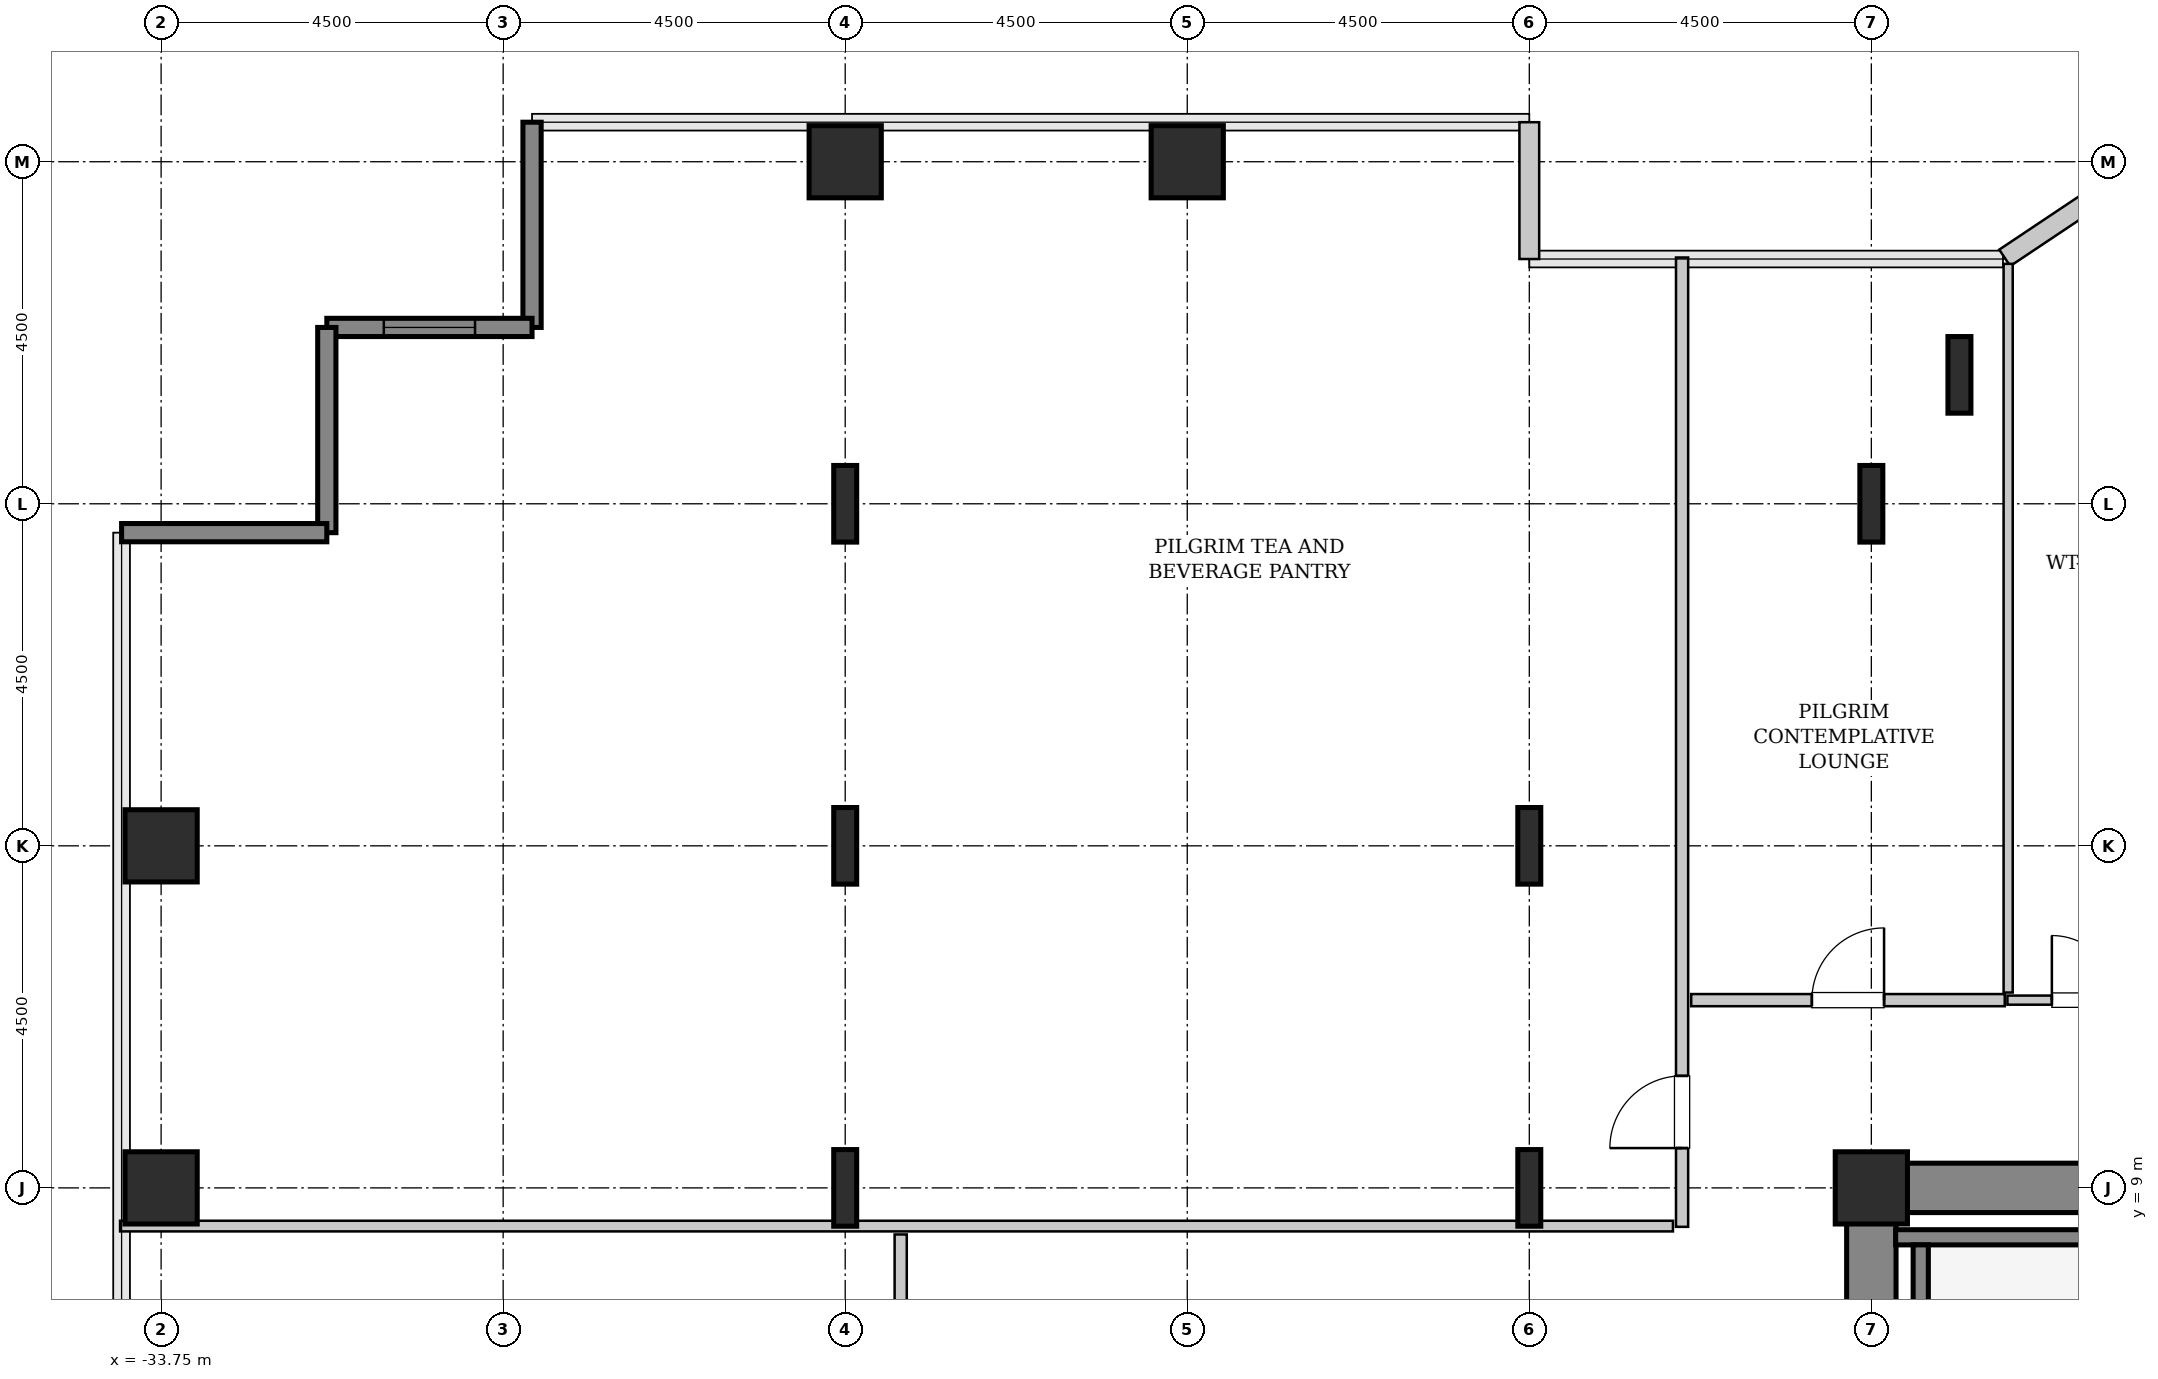
"""IFC4 building model, lengths in metres.
Left out: names, types, materials, properties, quantities, classifications, styles, units other than length and angle.
Written with IfcOpenShell. Run it as: python <this file> out.ifc"""

import sys

from ifc_helpers import new_model, si_unit, direction, frame, frame_2d, origin, origin_2d, place, context, subcontext, project, spatial, rectangle, hollow_rectangle, i_section, extrude, source, transform, mapped, element, fill, save


model = new_model("IFC4")
c1 = context("Model", 3, precision=1e-05, world=origin(), true_north=direction((0.0, 1.0)))
c2 = subcontext(c1, "Body", "Model", "MODEL_VIEW")
j1 = project(units=[si_unit("LENGTHUNIT", "METRE"), si_unit("PLANEANGLEUNIT", "RADIAN")], contexts=[c1])
p1 = place(None, origin())
s1 = spatial("IfcSite", under=j1, at=p1, CompositionType="ELEMENT")
p2 = place(p1, origin())
s2 = spatial("IfcBuilding", under=s1, at=p2, CompositionType="ELEMENT")
p3 = place(p2, frame((0.0, 0.0, 63.4)))
s3 = spatial("IfcBuildingStorey", under=s2, at=p3, CompositionType="ELEMENT", Elevation=63.4)
m1 = source(origin(), c2, "Body", "SweptSolid", [
    extrude(rectangle(XDim=10.025, YDim=0.65, at=frame_2d((5.012, 0.0))), origin(), (0.0, 0.0, 1.0), 3.8),
])
p4 = place(p3, frame((-11.575, 9.0, 0.0), z_axis=(0.0, 0.0, 1.0), x_axis=(1.0, 0.0, 0.0)))
e1 = element("IfcWall", 1, at=p4, inside=s3, PredefinedType="SHEAR", context=c2, shape_type="MappedRepresentation", body=[
    mapped(m1, transform((0.0, 0.0, 0.0), x_axis=(1.0, 0.0, 0.0), y_axis=(0.0, 1.0, 0.0), z_axis=(0.0, 0.0, 1.0), scale=1.0)),
])
m2 = source(origin(), c2, "Body", "SweptSolid", [
    extrude(rectangle(XDim=7.325, YDim=0.65, at=frame_2d((3.663, 0.0))), origin(), (0.0, 0.0, 1.0), 3.8),
])
p5 = place(p3, frame((-11.25, 1.35, 0.0), z_axis=(0.0, 0.0, 1.0), x_axis=(0.0, 1.0, 0.0)))
e2 = element("IfcWall", 2, at=p5, inside=s3, PredefinedType="SHEAR", context=c2, shape_type="MappedRepresentation", body=[
    mapped(m2, transform((0.0, 0.0, 0.0), x_axis=(1.0, 0.0, 0.0), y_axis=(0.0, 1.0, 0.0), z_axis=(0.0, 0.0, 1.0), scale=1.0)),
])
m3 = source(origin(), c2, "Body", "SweptSolid", [
    extrude(hollow_rectangle(XDim=0.95, YDim=0.95, WallThickness=0.045, InnerFilletRadius=0.045, OuterFilletRadius=0.09, at=origin_2d()), origin(), (0.0, 0.0, 1.0), 3.8),
])
for number, where, z_axis, x_axis in (
    (3, (-33.75, 9.0, 0.0), (0.0, 0.0, 1.0), (1.0, 0.0, 0.0)),
    (4, (-33.75, 13.5, 0.0), (0.0, 0.0, 1.0), (1.0, 0.0, 0.0)),
):
    element("IfcColumn", number, at=place(p3, frame(where, z_axis=z_axis, x_axis=x_axis)), inside=s3, PredefinedType="COLUMN", context=c2, shape_type="MappedRepresentation", body=[
        mapped(m3, transform((0.0, 0.0, 0.0), x_axis=(1.0, 0.0, 0.0), y_axis=(0.0, 1.0, 0.0), z_axis=(0.0, 0.0, 1.0), scale=1.0)),
    ])
m4 = source(origin(), c2, "Body", "SweptSolid", [
    extrude(i_section(OverallWidth=0.302, OverallDepth=1.008, WebThickness=0.021, FlangeThickness=0.04, FilletRadius=0.03, at=origin_2d()), origin(), (0.0, 0.0, 1.0), 3.8),
])
for number, where, z_axis, x_axis in (
    (5, (-24.75, 9.0, 0.0), (0.0, 0.0, 1.0), (1.0, 0.0, 0.0)),
    (6, (-24.75, 13.5, 0.0), (0.0, 0.0, 1.0), (1.0, 0.0, 0.0)),
    (7, (-24.75, 18.0, 0.0), (0.0, 0.0, 1.0), (1.0, 0.0, 0.0)),
):
    element("IfcColumn", number, at=place(p3, frame(where, z_axis=z_axis, x_axis=x_axis)), inside=s3, PredefinedType="COLUMN", context=c2, shape_type="MappedRepresentation", body=[
        mapped(m4, transform((0.0, 0.0, 0.0), x_axis=(1.0, 0.0, 0.0), y_axis=(0.0, 1.0, 0.0), z_axis=(0.0, 0.0, 1.0), scale=1.0)),
    ])
for number, where, z_axis, x_axis in (
    (8, (-24.75, 22.5, 0.0), (0.0, 0.0, 1.0), (1.0, 0.0, 0.0)),
    (9, (-20.25, 22.5, 0.0), (0.0, 0.0, 1.0), (1.0, 0.0, 0.0)),
):
    element("IfcColumn", number, at=place(p3, frame(where, z_axis=z_axis, x_axis=x_axis)), inside=s3, PredefinedType="COLUMN", context=c2, shape_type="MappedRepresentation", body=[
        mapped(m3, transform((0.0, 0.0, 0.0), x_axis=(1.0, 0.0, 0.0), y_axis=(0.0, 1.0, 0.0), z_axis=(0.0, 0.0, 1.0), scale=1.0)),
    ])
for number, where, z_axis, x_axis in (
    (10, (-15.75, 9.0, 0.0), (0.0, 0.0, 1.0), (1.0, 0.0, 0.0)),
    (11, (-15.75, 13.5, 0.0), (0.0, 0.0, 1.0), (1.0, 0.0, 0.0)),
):
    element("IfcColumn", number, at=place(p3, frame(where, z_axis=z_axis, x_axis=x_axis)), inside=s3, PredefinedType="COLUMN", context=c2, shape_type="MappedRepresentation", body=[
        mapped(m4, transform((0.0, 0.0, 0.0), x_axis=(1.0, 0.0, 0.0), y_axis=(0.0, 1.0, 0.0), z_axis=(0.0, 0.0, 1.0), scale=1.0)),
    ])
m5 = source(origin(), c2, "Body", "SweptSolid", [
    extrude(hollow_rectangle(XDim=0.95, YDim=0.95, WallThickness=0.045, InnerFilletRadius=0.045, OuterFilletRadius=0.09, at=origin_2d()), origin(), (0.0, 0.0, 1.0), 3.8),
])
p6 = place(p3, frame((-11.25, 9.0, 0.0), z_axis=(0.0, 0.0, 1.0), x_axis=(1.0, 0.0, 0.0)))
e12 = element("IfcColumn", 12, at=p6, inside=s3, PredefinedType="COLUMN", context=c2, shape_type="MappedRepresentation", body=[
    mapped(m5, transform((0.0, 0.0, 0.0), x_axis=(1.0, 0.0, 0.0), y_axis=(0.0, 1.0, 0.0), z_axis=(0.0, 0.0, 1.0), scale=1.0)),
])
for number, where, z_axis, x_axis in (
    (13, (-11.25, 18.0, 0.0), (0.0, 0.0, 1.0), (1.0, 0.0, 0.0)),
    (14, (-10.091, 19.696, 0.0), (0.0, 0.0, 1.0), (1.0, 0.0, 0.0)),
):
    element("IfcColumn", number, at=place(p3, frame(where, z_axis=z_axis, x_axis=x_axis)), inside=s3, PredefinedType="COLUMN", context=c2, shape_type="MappedRepresentation", body=[
        mapped(m4, transform((0.0, 0.0, 0.0), x_axis=(1.0, 0.0, 0.0), y_axis=(0.0, 1.0, 0.0), z_axis=(0.0, 0.0, 1.0), scale=1.0)),
    ])
m6 = source(origin(), c2, "Body", "SweptSolid", [
    extrude(rectangle(XDim=1.469, YDim=0.26, at=frame_2d((0.734, 0.0))), origin(), (0.0, 0.0, 1.0), 3.55),
])
p7 = place(p3, frame((-8.273, 22.052, 0.0), z_axis=(0.0, 0.0, 1.0), x_axis=(-0.831461760506, -0.555581983884, 0.0)))
e15 = element("IfcWall", 15, at=p7, inside=s3, PredefinedType="SOLIDWALL", context=c2, shape_type="MappedRepresentation", body=[
    mapped(m6, transform((0.0, 0.0, 0.0), x_axis=(1.0, 0.0, 0.0), y_axis=(0.0, 1.0, 0.0), z_axis=(0.0, 0.0, 1.0), scale=1.0)),
])
m7 = source(origin(), c2, "Body", "SweptSolid", [
    extrude(rectangle(XDim=1.8, YDim=0.26, at=frame_2d((0.9, 0.0))), origin(), (0.0, 0.0, 1.0), 3.55),
])
p8 = place(p3, frame((-15.75, 21.22, 0.0), z_axis=(0.0, 0.0, 1.0), x_axis=(0.0, 1.0, 0.0)))
e16 = element("IfcWall", 16, at=p8, inside=s3, PredefinedType="SOLIDWALL", context=c2, shape_type="MappedRepresentation", body=[
    mapped(m7, transform((0.0, 0.0, 0.0), x_axis=(1.0, 0.0, 0.0), y_axis=(0.0, 1.0, 0.0), z_axis=(0.0, 0.0, 1.0), scale=1.0)),
])
m8 = source(origin(), c2, "Body", "SweptSolid", [
    extrude(rectangle(XDim=2.7, YDim=0.24, at=frame_2d((1.35, 0.0))), origin(), (0.0, 0.0, 1.0), 3.55),
])
p9 = place(p3, frame((-28.87, 23.02, 0.0), z_axis=(0.0, 0.0, 1.0), x_axis=(0.0, -1.0, 0.0)))
e17 = element("IfcWall", 17, at=p9, inside=s3, PredefinedType="SHEAR", context=c2, shape_type="MappedRepresentation", body=[
    mapped(m8, transform((0.0, 0.0, 0.0), x_axis=(1.0, 0.0, 0.0), y_axis=(0.0, 1.0, 0.0), z_axis=(0.0, 0.0, 1.0), scale=1.0)),
])
p10 = place(p3, frame((-28.87, 20.32, 0.0), z_axis=(0.0, 0.0, 1.0), x_axis=(-1.0, 0.0, 0.0)))
e18 = element("IfcWall", 18, at=p10, inside=s3, PredefinedType="SHEAR", context=c2, shape_type="MappedRepresentation", body=[
    mapped(m8, transform((0.0, 0.0, 0.0), x_axis=(1.0, 0.0, 0.0), y_axis=(0.0, 1.0, 0.0), z_axis=(0.0, 0.0, 1.0), scale=1.0)),
])
p11 = place(p10, frame((0.75, 0.0, 0.85)))
e19 = element("IfcOpeningElement", 19, at=p11, cuts=e18, PredefinedType="OPENING", context=c2, shape_type="SweptSolid", body=[
    extrude(rectangle(XDim=1.2, YDim=1.8, at=frame_2d((0.6, 0.9))), frame((0.0, 0.13, 0.0), z_axis=(0.0, -1.0, 0.0), x_axis=(1.0, 0.0, 0.0)), (0.0, 0.0, 1.0), 0.26),
])
for number, where, z_axis, x_axis in (
    (20, (-31.57, 20.32, 0.0), (0.0, 0.0, 1.0), (0.0, -1.0, 0.0)),
    (21, (-31.57, 17.62, 0.0), (0.0, 0.0, 1.0), (-1.0, 0.0, 0.0)),
):
    element("IfcWall", number, at=place(p3, frame(where, z_axis=z_axis, x_axis=x_axis)), inside=s3, PredefinedType="SHEAR", context=c2, shape_type="MappedRepresentation", body=[
        mapped(m8, transform((0.0, 0.0, 0.0), x_axis=(1.0, 0.0, 0.0), y_axis=(0.0, 1.0, 0.0), z_axis=(0.0, 0.0, 1.0), scale=1.0)),
    ])
m9 = source(origin(), c2, "Body", "SweptSolid", [
    extrude(rectangle(XDim=3.63, YDim=0.2, at=frame_2d((1.815, 0.0))), origin(), (0.0, 0.0, 1.0), 3.8),
])
p12 = place(p3, frame((-7.3, 8.35, 0.0), z_axis=(0.0, 0.0, 1.0), x_axis=(-1.0, 0.0, 0.0)))
e22 = element("IfcWall", 22, at=p12, inside=s3, PredefinedType="SOLIDWALL", context=c2, shape_type="MappedRepresentation", body=[
    mapped(m9, transform((0.0, 0.0, 0.0), x_axis=(1.0, 0.0, 0.0), y_axis=(0.0, 1.0, 0.0), z_axis=(0.0, 0.0, 1.0), scale=1.0)),
])
m10 = source(origin(), c2, "Body", "SweptSolid", [
    extrude(rectangle(XDim=7.1, YDim=0.2, at=frame_2d((3.55, 0.0))), origin(), (0.0, 0.0, 1.0), 3.8),
])
p13 = place(p3, frame((-10.6, 1.15, 0.0), z_axis=(0.0, 0.0, 1.0), x_axis=(0.0, 1.0, 0.0)))
e23 = element("IfcWall", 23, at=p13, inside=s3, PredefinedType="SOLIDWALL", context=c2, shape_type="MappedRepresentation", body=[
    mapped(m10, transform((0.0, 0.0, 0.0), x_axis=(1.0, 0.0, 0.0), y_axis=(0.0, 1.0, 0.0), z_axis=(0.0, 0.0, 1.0), scale=1.0)),
])
m11 = source(origin(), c2, "Body", "SweptSolid", [
    extrude(rectangle(XDim=2.02, YDim=0.12, at=frame_2d((1.01, 0.0))), origin(), (0.0, 0.0, 1.0), 3.535),
])
p14 = place(p3, frame((-9.46, 11.47, 0.0), z_axis=(0.0, 0.0, 1.0), x_axis=(1.0, 0.0, 0.0)))
e24 = element("IfcWall", 24, at=p14, inside=s3, PredefinedType="PLUMBINGWALL", context=c2, shape_type="MappedRepresentation", body=[
    mapped(m11, transform((0.0, 0.0, 0.0), x_axis=(1.0, 0.0, 0.0), y_axis=(0.0, 1.0, 0.0), z_axis=(0.0, 0.0, 1.0), scale=1.0)),
])
p15 = place(p14, frame((0.585, 0.0, 0.0)))
e25 = element("IfcOpeningElement", 25, at=p15, cuts=e24, PredefinedType="OPENING", context=c2, shape_type="SweptSolid", body=[
    extrude(rectangle(XDim=0.85, YDim=2.1, at=frame_2d((0.425, 1.05))), frame((0.0, 0.07, 0.0), z_axis=(0.0, -1.0, 0.0), x_axis=(1.0, 0.0, 0.0)), (0.0, 0.0, 1.0), 0.14),
])
m12 = source(origin(), c2, "Body", "SweptSolid", [
    extrude(rectangle(XDim=9.587, YDim=0.12, at=frame_2d((4.793, 0.0))), origin(), (0.0, 0.0, 1.0), 3.535),
])
p16 = place(p3, frame((-9.45, 11.57, 0.0), z_axis=(0.0, 0.0, 1.0), x_axis=(0.0, 1.0, 0.0)))
e26 = element("IfcWall", 26, at=p16, inside=s3, PredefinedType="PLUMBINGWALL", context=c2, shape_type="MappedRepresentation", body=[
    mapped(m12, transform((0.0, 0.0, 0.0), x_axis=(1.0, 0.0, 0.0), y_axis=(0.0, 1.0, 0.0), z_axis=(0.0, 0.0, 1.0), scale=1.0)),
])
m13 = source(origin(), c2, "Body", "SweptSolid", [
    extrude(rectangle(XDim=12.752, YDim=0.16, at=frame_2d((6.376, 0.0))), origin(), (0.0, 0.0, 1.0), 3.535),
])
p17 = place(p3, frame((-13.74, 8.488, 0.0), z_axis=(0.0, 0.0, 1.0), x_axis=(0.0, 1.0, 0.0)))
e27 = element("IfcWall", 27, at=p17, inside=s3, PredefinedType="PARTITIONING", context=c2, shape_type="MappedRepresentation", body=[
    mapped(m13, transform((0.0, 0.0, 0.0), x_axis=(1.0, 0.0, 0.0), y_axis=(0.0, 1.0, 0.0), z_axis=(0.0, 0.0, 1.0), scale=1.0)),
])
p18 = place(p17, frame((1.036, 0.0, 0.0)))
e28 = element("IfcOpeningElement", 28, at=p18, cuts=e27, PredefinedType="OPENING", context=c2, shape_type="SweptSolid", body=[
    extrude(rectangle(XDim=0.95, YDim=2.1, at=frame_2d((0.475, 1.05))), frame((0.0, 0.09, 0.0), z_axis=(0.0, -1.0, 0.0), x_axis=(1.0, 0.0, 0.0)), (0.0, 0.0, 1.0), 0.18),
])
m14 = source(origin(), c2, "Body", "SweptSolid", [
    extrude(rectangle(XDim=20.43, YDim=0.14, at=frame_2d((10.215, 0.0))), origin(), (0.0, 0.0, 1.0), 2.825),
])
p19 = place(p3, frame((-34.29, 8.498, 0.0), z_axis=(0.0, 0.0, 1.0), x_axis=(1.0, 0.0, 0.0)))
e29 = element("IfcWall", 29, at=p19, inside=s3, PredefinedType="PARTITIONING", context=c2, shape_type="MappedRepresentation", body=[
    mapped(m14, transform((0.0, 0.0, 0.0), x_axis=(1.0, 0.0, 0.0), y_axis=(0.0, 1.0, 0.0), z_axis=(0.0, 0.0, 1.0), scale=1.0)),
])
m15 = source(origin(), c2, "Body", "SweptSolid", [
    extrude(rectangle(XDim=14.282, YDim=0.16, at=frame_2d((7.141, 0.0))), origin(), (0.0, 0.0, 1.0), 3.535),
])
p20 = place(p3, frame((-24.02, -5.895, 0.0), z_axis=(0.0, 0.0, 1.0), x_axis=(0.0, 1.0, 0.0)))
e30 = element("IfcWall", 30, at=p20, inside=s3, PredefinedType="PARTITIONING", context=c2, shape_type="MappedRepresentation", body=[
    mapped(m15, transform((0.0, 0.0, 0.0), x_axis=(1.0, 0.0, 0.0), y_axis=(0.0, 1.0, 0.0), z_axis=(0.0, 0.0, 1.0), scale=1.0)),
])
p21 = place(p20, frame((7.67, 0.0, 0.0)))
e31 = element("IfcOpeningElement", 31, at=p21, cuts=e30, PredefinedType="OPENING", context=c2, shape_type="SweptSolid", body=[
    extrude(rectangle(XDim=0.95, YDim=2.1, at=frame_2d((0.475, 1.05))), frame((0.0, 0.09, 0.0), z_axis=(0.0, -1.0, 0.0), x_axis=(1.0, 0.0, 0.0)), (0.0, 0.0, 1.0), 0.18),
])
m16 = source(origin(), c2, "Body", "SweptSolid", [
    extrude(rectangle(XDim=4.125, YDim=0.16, at=frame_2d((2.062, 0.0))), origin(), (0.0, 0.0, 1.0), 3.535),
])
p22 = place(p3, frame((-13.62, 11.47, 0.0), z_axis=(0.0, 0.0, 1.0), x_axis=(1.0, 0.0, 0.0)))
e32 = element("IfcWall", 32, at=p22, inside=s3, PredefinedType="PARTITIONING", context=c2, shape_type="MappedRepresentation", body=[
    mapped(m16, transform((0.0, 0.0, 0.0), x_axis=(1.0, 0.0, 0.0), y_axis=(0.0, 1.0, 0.0), z_axis=(0.0, 0.0, 1.0), scale=1.0)),
])
p23 = place(p22, frame((1.587, 0.0, 0.0)))
e33 = element("IfcOpeningElement", 33, at=p23, cuts=e32, PredefinedType="OPENING", context=c2, shape_type="SweptSolid", body=[
    extrude(rectangle(XDim=0.95, YDim=2.1, at=frame_2d((0.475, 1.05))), frame((0.0, 0.09, 0.0), z_axis=(0.0, -1.0, 0.0), x_axis=(1.0, 0.0, 0.0)), (0.0, 0.0, 1.0), 0.18),
])
m17 = source(origin(), c2, "Body", "SweptSolid", [
    extrude(rectangle(XDim=1.2, YDim=1.8, at=frame_2d((0.6, 0.9))), frame((0.0, 0.03, 0.0), z_axis=(0.0, -1.0, 0.0), x_axis=(1.0, 0.0, 0.0)), (0.0, 0.0, 1.0), 0.06),
])
p24 = place(p11, origin())
e34 = element("IfcWindow", 34, at=p24, inside=s3, PartitioningType="SINGLE_PANEL", PredefinedType="WINDOW", context=c2, shape_type="MappedRepresentation", body=[
    mapped(m17, transform((0.0, 0.0, 0.0), x_axis=(1.0, 0.0, 0.0), y_axis=(0.0, 1.0, 0.0), z_axis=(0.0, 0.0, 1.0), scale=1.0)),
])
fill(e19, e34)
m18 = source(origin(), c2, "Body", "SweptSolid", [
    extrude(rectangle(XDim=0.85, YDim=2.1, at=frame_2d((0.425, 1.05))), frame((0.0, 0.025, 0.0), z_axis=(0.0, -1.0, 0.0), x_axis=(1.0, 0.0, 0.0)), (0.0, 0.0, 1.0), 0.05),
])
p25 = place(p15, origin())
e35 = element("IfcDoor", 35, at=p25, inside=s3, OperationType="SINGLE_SWING_LEFT", PredefinedType="DOOR", context=c2, shape_type="MappedRepresentation", body=[
    mapped(m18, transform((0.0, 0.0, 0.0), x_axis=(1.0, 0.0, 0.0), y_axis=(0.0, 1.0, 0.0), z_axis=(0.0, 0.0, 1.0), scale=1.0)),
])
fill(e25, e35)
m19 = source(origin(), c2, "Body", "SweptSolid", [
    extrude(rectangle(XDim=0.95, YDim=2.1, at=frame_2d((0.475, 1.05))), frame((0.0, 0.025, 0.0), z_axis=(0.0, -1.0, 0.0), x_axis=(1.0, 0.0, 0.0)), (0.0, 0.0, 1.0), 0.05),
])
p26 = place(p18, origin())
e36 = element("IfcDoor", 36, at=p26, inside=s3, OperationType="SINGLE_SWING_LEFT", PredefinedType="DOOR", context=c2, shape_type="MappedRepresentation", body=[
    mapped(m19, transform((0.0, 0.0, 0.0), x_axis=(1.0, 0.0, 0.0), y_axis=(0.0, 1.0, 0.0), z_axis=(0.0, 0.0, 1.0), scale=1.0)),
])
fill(e28, e36)
p27 = place(p23, origin())
e37 = element("IfcDoor", 37, at=p27, inside=s3, OperationType="SINGLE_SWING_RIGHT", PredefinedType="DOOR", context=c2, shape_type="MappedRepresentation", body=[
    mapped(m19, transform((0.0, 0.0, 0.0), x_axis=(1.0, 0.0, 0.0), y_axis=(0.0, 1.0, 0.0), z_axis=(0.0, 0.0, 1.0), scale=1.0)),
])
fill(e33, e37)
save(model, sys.argv[1])
